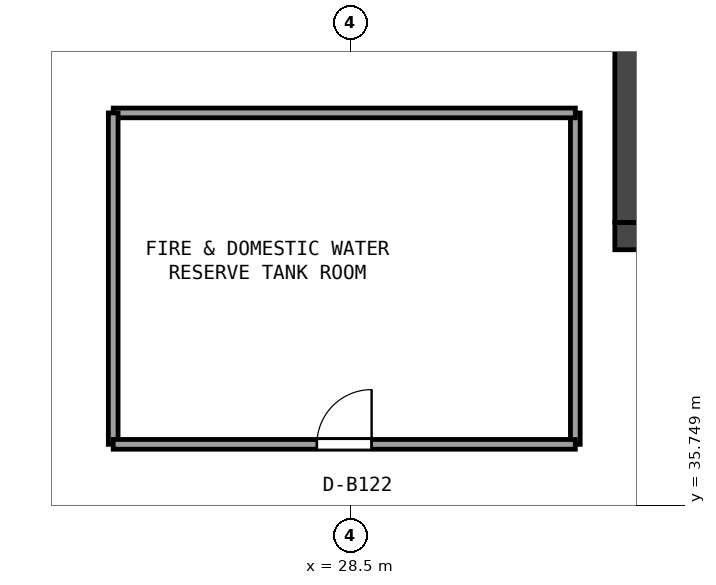
"""IFC4 building model, lengths in metres.
Left out: names, types, materials, properties, quantities, classifications, styles, units other than length and angle.
Written with IfcOpenShell. Run it as: python <this file> out.ifc"""

import sys

from ifc_helpers import new_model, si_unit, direction, frame, frame_2d, origin, place, context, subcontext, project, spatial, rectangle, extrude, element, fill, save


model = new_model("IFC4")
c1 = context("Model", 3, precision=1e-05, world=origin(), true_north=direction((0.0, 1.0)))
c2 = subcontext(c1, "Body", "Model", "MODEL_VIEW")
j1 = project(units=[si_unit("LENGTHUNIT", "METRE"), si_unit("PLANEANGLEUNIT", "RADIAN")], contexts=[c1])
p1 = place(None, origin())
s1 = spatial("IfcSite", under=j1, at=p1, CompositionType="ELEMENT")
p2 = place(p1, origin())
s2 = spatial("IfcBuilding", under=s1, at=p2, CompositionType="ELEMENT")
p3 = place(p2, frame((0.0, 0.0, -5.4)))
s3 = spatial("IfcBuildingStorey", under=s2, at=p3, CompositionType="ELEMENT", Elevation=-5.4)
p4 = place(p3, frame((32.85, 40.175, 0.0), z_axis=(0.0, 0.0, 1.0), x_axis=(1.0, 0.0, 0.0)))
e1 = element("IfcWall", 1, at=p4, inside=s3, PredefinedType="SHEAR", context=c2, shape_type="SweptSolid", body=[
    extrude(rectangle(XDim=4.6, YDim=0.45, at=frame_2d((2.3, 0.0))), origin(), (0.0, 0.0, 1.0), 5.05),
])
p5 = place(p3, frame((33.075, 40.4, 0.0), z_axis=(0.0, 0.0, 1.0), x_axis=(0.0, 1.0, 0.0)))
e2 = element("IfcWall", 2, at=p5, inside=s3, PredefinedType="SHEAR", context=c2, shape_type="SweptSolid", body=[
    extrude(rectangle(XDim=8.0, YDim=0.45, at=frame_2d((4.0, 0.0))), origin(), (0.0, 0.0, 1.0), 5.05),
])
p6 = place(p3, frame((32.2, 36.75, 0.0), z_axis=(0.0, 0.0, 1.0), x_axis=(0.0, 1.0, 0.0)))
e3 = element("IfcWall", 3, at=p6, inside=s3, PredefinedType="PARTITIONING", context=c2, shape_type="SweptSolid", body=[
    extrude(rectangle(XDim=5.45, YDim=0.16, at=frame_2d((2.725, 0.0))), origin(), (0.0, 0.0, 1.0), 5.05),
])
p7 = place(p3, frame((32.2, 42.2, 0.0), z_axis=(0.0, 0.0, 1.0), x_axis=(-1.0, 0.0, 0.0)))
e4 = element("IfcWall", 4, at=p7, inside=s3, PredefinedType="PARTITIONING", context=c2, shape_type="SweptSolid", body=[
    extrude(rectangle(XDim=7.6, YDim=0.16, at=frame_2d((3.8, 0.0))), origin(), (0.0, 0.0, 1.0), 4.135),
])
p8 = place(p3, frame((24.6, 42.2, 0.0), z_axis=(0.0, 0.0, 1.0), x_axis=(0.0, -1.0, 0.0)))
e5 = element("IfcWall", 5, at=p8, inside=s3, PredefinedType="PARTITIONING", context=c2, shape_type="SweptSolid", body=[
    extrude(rectangle(XDim=5.45, YDim=0.16, at=frame_2d((2.725, 0.0))), origin(), (0.0, 0.0, 1.0), 4.627),
])
p9 = place(p3, frame((24.6, 36.75, 0.0), z_axis=(0.0, 0.0, 1.0), x_axis=(1.0, 0.0, 0.0)))
e6 = element("IfcWall", 6, at=p9, inside=s3, PredefinedType="PARTITIONING", context=c2, shape_type="SweptSolid", body=[
    extrude(rectangle(XDim=7.6, YDim=0.16, at=frame_2d((3.8, 0.0))), origin(), (0.0, 0.0, 1.0), 4.135),
])
p10 = place(p9, frame((3.35, 0.0, 0.0)))
e7 = element("IfcOpeningElement", 7, at=p10, cuts=e6, PredefinedType="OPENING", context=c2, shape_type="SweptSolid", body=[
    extrude(rectangle(XDim=0.9, YDim=2.0, at=frame_2d((0.45, 1.0))), frame((0.0, 0.09, 0.0), z_axis=(0.0, -1.0, 0.0), x_axis=(1.0, 0.0, 0.0)), (0.0, 0.0, 1.0), 0.18),
])
p11 = place(p10, origin())
e8 = element("IfcDoor", 8, at=p11, inside=s3, OperationType="SINGLE_SWING_RIGHT", PredefinedType="DOOR", context=c2, shape_type="SweptSolid", body=[
    extrude(rectangle(XDim=0.9, YDim=2.0, at=frame_2d((0.45, 1.0))), frame((0.0, 0.025, 0.0), z_axis=(0.0, -1.0, 0.0), x_axis=(1.0, 0.0, 0.0)), (0.0, 0.0, 1.0), 0.05),
])
fill(e7, e8)
save(model, sys.argv[1])
